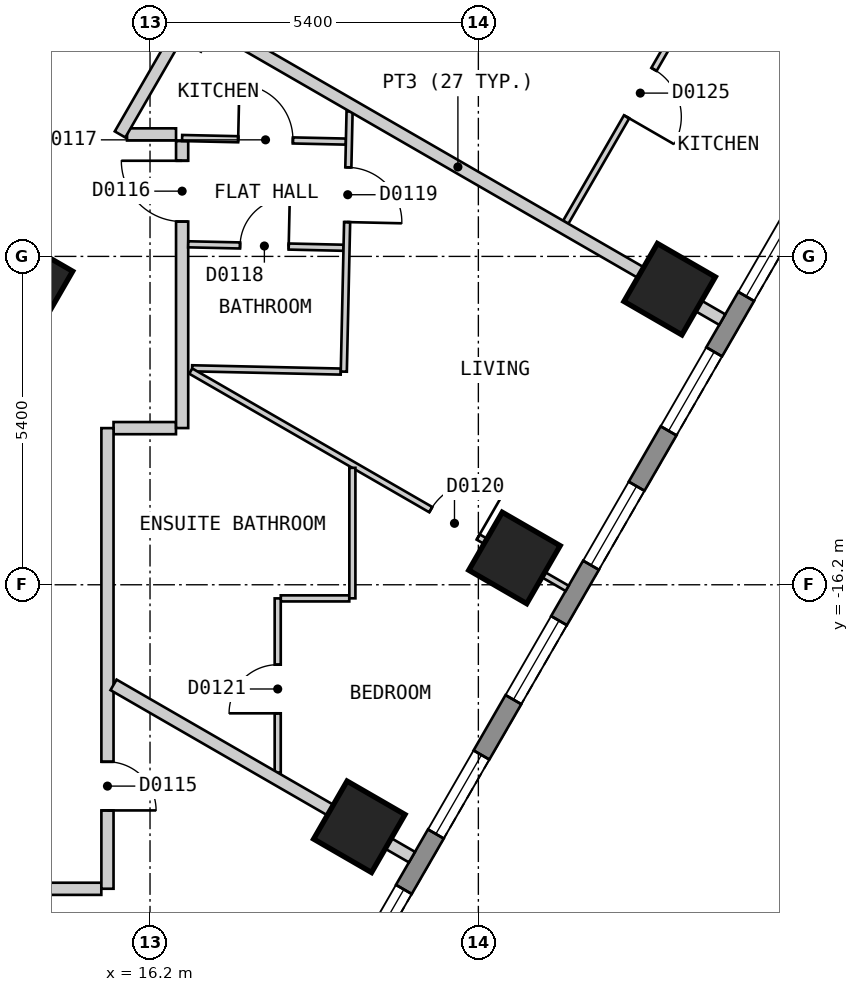
"""IFC4 building model, lengths in metres.
Left out: names, types, materials, properties, quantities, classifications, styles, units other than length and angle.
Written with IfcOpenShell. Run it as: python <this file> out.ifc"""

import sys

from ifc_helpers import new_model, si_unit, direction, frame, frame_2d, origin, origin_2d, place, context, subcontext, project, spatial, polyline, rectangle, outline, extrude, element, fill, save


model = new_model("IFC4")
c1 = context("Model", 3, precision=1e-05, world=origin(), true_north=direction((0.0, 1.0)))
c2 = subcontext(c1, "Body", "Model", "MODEL_VIEW")
j1 = project(units=[si_unit("LENGTHUNIT", "METRE"), si_unit("PLANEANGLEUNIT", "RADIAN")], contexts=[c1])
p1 = place(None, origin())
s1 = spatial("IfcSite", under=j1, at=p1, CompositionType="ELEMENT")
p2 = place(p1, origin())
s2 = spatial("IfcBuilding", under=s1, at=p2, CompositionType="ELEMENT")
p3 = place(p2, frame((0.0, 0.0, 29.4)))
s3 = spatial("IfcBuildingStorey", under=s2, at=p3, CompositionType="ELEMENT", Elevation=29.4)
for number, where, z_axis, x_axis in (
    (1, (19.642, -20.18, 0.0), (0.0, 0.0, 1.0), (0.5, 0.866, 0.0)),
    (2, (22.194, -15.759, 0.0), (0.0, 0.0, 1.0), (0.5, 0.866, 0.0)),
    (3, (24.746, -11.339, 0.0), (0.0, 0.0, 1.0), (0.5, 0.866, 0.0)),
    (4, (27.298, -6.919, 0.0), (0.0, 0.0, 1.0), (0.5, 0.866, 0.0)),
):
    element("IfcColumn", number, at=place(p3, frame(where, z_axis=z_axis, x_axis=x_axis)), inside=s3, PredefinedType="COLUMN", context=c2, shape_type="SweptSolid", body=[
        extrude(rectangle(XDim=1.1, YDim=1.1, at=origin_2d()), origin(), (0.0, 0.0, 1.0), 3.0),
    ])
p4 = place(p3, frame((14.313, -11.209, 0.0), z_axis=(0.0, 0.0, 1.0), x_axis=(0.499984884929, 0.866034130299, 0.0)))
e5 = element("IfcColumn", 5, at=p4, inside=s3, PredefinedType="COLUMN", context=c2, shape_type="SweptSolid", body=[
    extrude(rectangle(XDim=0.9, YDim=0.9, at=origin_2d()), origin(), (0.0, 0.0, 1.0), 3.0),
])
p5 = place(p3, frame((17.71, -25.825, 0.0), z_axis=(0.0, 0.0, 1.0), x_axis=(0.500001938803, 0.866024284413, 0.0)))
e6 = element("IfcWall", 6, at=p5, inside=s3, PredefinedType="SOLIDWALL", context=c2, shape_type="SweptSolid", body=[
    extrude(outline(polyline([(0.0, -0.15), (27.02, -0.15), (26.94, 0.15), (0.08, 0.15), (0.0, -0.15)])), origin(), (0.0, 0.0, 1.0), 2.7),
])
p6 = place(p5, frame((1.277, 0.0, 0.15)))
e7 = element("IfcOpeningElement", 7, at=p6, cuts=e6, PredefinedType="OPENING", context=c2, shape_type="SweptSolid", body=[
    extrude(rectangle(XDim=1.5, YDim=2.1, at=frame_2d((0.75, 1.05))), frame((0.0, 0.16, 0.0), z_axis=(0.0, -1.0, 0.0), x_axis=(1.0, 0.0, 0.0)), (0.0, 0.0, 1.0), 0.32),
])
p7 = place(p5, frame((3.829, 0.0, 0.15)))
e8 = element("IfcOpeningElement", 8, at=p7, cuts=e6, PredefinedType="OPENING", context=c2, shape_type="SweptSolid", body=[
    extrude(rectangle(XDim=1.5, YDim=2.1, at=frame_2d((0.75, 1.05))), frame((0.0, 0.16, 0.0), z_axis=(0.0, -1.0, 0.0), x_axis=(1.0, 0.0, 0.0)), (0.0, 0.0, 1.0), 0.32),
])
p8 = place(p5, frame((6.382, 0.0, 0.15)))
e9 = element("IfcOpeningElement", 9, at=p8, cuts=e6, PredefinedType="OPENING", context=c2, shape_type="SweptSolid", body=[
    extrude(rectangle(XDim=1.5, YDim=2.1, at=frame_2d((0.75, 1.05))), frame((0.0, 0.16, 0.0), z_axis=(0.0, -1.0, 0.0), x_axis=(1.0, 0.0, 0.0)), (0.0, 0.0, 1.0), 0.32),
])
p9 = place(p5, frame((8.933, 0.0, 0.15)))
e10 = element("IfcOpeningElement", 10, at=p9, cuts=e6, PredefinedType="OPENING", context=c2, shape_type="SweptSolid", body=[
    extrude(rectangle(XDim=1.5, YDim=2.1, at=frame_2d((0.75, 1.05))), frame((0.0, 0.16, 0.0), z_axis=(0.0, -1.0, 0.0), x_axis=(1.0, 0.0, 0.0)), (0.0, 0.0, 1.0), 0.32),
])
p10 = place(p5, frame((11.485, 0.0, 0.15)))
e11 = element("IfcOpeningElement", 11, at=p10, cuts=e6, PredefinedType="OPENING", context=c2, shape_type="SweptSolid", body=[
    extrude(rectangle(XDim=1.5, YDim=2.1, at=frame_2d((0.75, 1.05))), frame((0.0, 0.16, 0.0), z_axis=(0.0, -1.0, 0.0), x_axis=(1.0, 0.0, 0.0)), (0.0, 0.0, 1.0), 0.32),
])
p11 = place(p5, frame((14.037, 0.0, 0.15)))
e12 = element("IfcOpeningElement", 12, at=p11, cuts=e6, PredefinedType="OPENING", context=c2, shape_type="SweptSolid", body=[
    extrude(rectangle(XDim=1.5, YDim=2.1, at=frame_2d((0.75, 1.05))), frame((0.0, 0.16, 0.0), z_axis=(0.0, -1.0, 0.0), x_axis=(1.0, 0.0, 0.0)), (0.0, 0.0, 1.0), 0.32),
])
p12 = place(p5, frame((16.589, 0.0, 0.15)))
e13 = element("IfcOpeningElement", 13, at=p12, cuts=e6, PredefinedType="OPENING", context=c2, shape_type="SweptSolid", body=[
    extrude(rectangle(XDim=1.5, YDim=2.1, at=frame_2d((0.75, 1.05))), frame((0.0, 0.16, 0.0), z_axis=(0.0, -1.0, 0.0), x_axis=(1.0, 0.0, 0.0)), (0.0, 0.0, 1.0), 0.32),
])
p13 = place(p5, frame((19.141, 0.0, 0.15)))
e14 = element("IfcOpeningElement", 14, at=p13, cuts=e6, PredefinedType="OPENING", context=c2, shape_type="SweptSolid", body=[
    extrude(rectangle(XDim=1.5, YDim=2.1, at=frame_2d((0.75, 1.05))), frame((0.0, 0.16, 0.0), z_axis=(0.0, -1.0, 0.0), x_axis=(1.0, 0.0, 0.0)), (0.0, 0.0, 1.0), 0.32),
])
p14 = place(p5, frame((21.693, 0.0, 0.15)))
e15 = element("IfcOpeningElement", 15, at=p14, cuts=e6, PredefinedType="OPENING", context=c2, shape_type="SweptSolid", body=[
    extrude(rectangle(XDim=1.5, YDim=2.1, at=frame_2d((0.75, 1.05))), frame((0.0, 0.16, 0.0), z_axis=(0.0, -1.0, 0.0), x_axis=(1.0, 0.0, 0.0)), (0.0, 0.0, 1.0), 0.32),
])
p15 = place(p5, frame((24.244, 0.0, 0.15)))
e16 = element("IfcOpeningElement", 16, at=p15, cuts=e6, PredefinedType="OPENING", context=c2, shape_type="SweptSolid", body=[
    extrude(rectangle(XDim=1.5, YDim=2.1, at=frame_2d((0.75, 1.05))), frame((0.0, 0.16, 0.0), z_axis=(0.0, -1.0, 0.0), x_axis=(1.0, 0.0, 0.0)), (0.0, 0.0, 1.0), 0.32),
])
p16 = place(p3, frame((15.822, -8.794, 0.0), z_axis=(0.0, 0.0, 1.0), x_axis=(1.0, 0.0, 0.0)))
e17 = element("IfcWall", 17, at=p16, inside=s3, PredefinedType="PARTITIONING", context=c2, shape_type="SweptSolid", body=[
    extrude(rectangle(XDim=0.806, YDim=0.2, at=frame_2d((0.403, 0.0))), origin(), (0.0, 0.0, 1.0), 2.7),
])
p17 = place(p3, frame((15.6, -13.624, 0.0), z_axis=(0.0, 0.0, 1.0), x_axis=(1.0, 0.0, 0.0)))
e18 = element("IfcWall", 18, at=p17, inside=s3, PredefinedType="PARTITIONING", context=c2, shape_type="SweptSolid", body=[
    extrude(rectangle(XDim=1.027, YDim=0.2, at=frame_2d((0.513, 0.0))), origin(), (0.0, 0.0, 1.0), 2.7),
])
p18 = place(p3, frame((-15.4, -21.2, 0.0), z_axis=(0.0, 0.0, 1.0), x_axis=(1.0, 0.0, 0.0)))
e19 = element("IfcWall", 19, at=p18, inside=s3, PredefinedType="PARTITIONING", context=c2, shape_type="SweptSolid", body=[
    extrude(rectangle(XDim=30.799, YDim=0.2, at=frame_2d((15.399, 0.0))), origin(), (0.0, 0.0, 1.0), 2.7),
])
p19 = place(p18, frame((4.985, 0.0, 0.0)))
e20 = element("IfcOpeningElement", 20, at=p19, cuts=e19, PredefinedType="OPENING", context=c2, shape_type="SweptSolid", body=[
    extrude(rectangle(XDim=0.9, YDim=2.1, at=frame_2d((0.45, 1.05))), frame((0.0, 0.11, 0.0), z_axis=(0.0, -1.0, 0.0), x_axis=(1.0, 0.0, 0.0)), (0.0, 0.0, 1.0), 0.22),
])
p20 = place(p18, frame((14.901, 0.0, 0.0)))
e21 = element("IfcOpeningElement", 21, at=p20, cuts=e19, PredefinedType="OPENING", context=c2, shape_type="SweptSolid", body=[
    extrude(rectangle(XDim=1.0, YDim=2.1, at=frame_2d((0.5, 1.05))), frame((0.0, 0.11, 0.0), z_axis=(0.0, -1.0, 0.0), x_axis=(1.0, 0.0, 0.0)), (0.0, 0.0, 1.0), 0.22),
])
p21 = place(p18, frame((20.005, 0.0, 0.0)))
e22 = element("IfcOpeningElement", 22, at=p21, cuts=e19, PredefinedType="OPENING", context=c2, shape_type="SweptSolid", body=[
    extrude(rectangle(XDim=1.0, YDim=2.1, at=frame_2d((0.5, 1.05))), frame((0.0, 0.11, 0.0), z_axis=(0.0, -1.0, 0.0), x_axis=(1.0, 0.0, 0.0)), (0.0, 0.0, 1.0), 0.22),
])
p22 = place(p18, frame((24.916, 0.0, 0.0)))
e23 = element("IfcOpeningElement", 23, at=p22, cuts=e19, PredefinedType="OPENING", context=c2, shape_type="SweptSolid", body=[
    extrude(rectangle(XDim=0.9, YDim=2.1, at=frame_2d((0.45, 1.05))), frame((0.0, 0.11, 0.0), z_axis=(0.0, -1.0, 0.0), x_axis=(1.0, 0.0, 0.0)), (0.0, 0.0, 1.0), 0.22),
])
p23 = place(p3, frame((15.707, -8.794, 0.0), z_axis=(0.0, 0.0, 1.0), x_axis=(0.500040469623, 0.866002037376, 0.0)))
e24 = element("IfcWall", 24, at=p23, inside=s3, PredefinedType="PARTITIONING", context=c2, shape_type="SweptSolid", body=[
    extrude(rectangle(XDim=2.281, YDim=0.2, at=frame_2d((1.141, 0.0))), origin(), (0.0, 0.0, 1.0), 2.7),
])
p24 = place(p3, frame((15.5, -21.199, 0.0), z_axis=(0.0, 0.0, 1.0), x_axis=(0.0, 1.0, 0.0)))
e25 = element("IfcWall", 25, at=p24, inside=s3, PredefinedType="PARTITIONING", context=c2, shape_type="SweptSolid", body=[
    extrude(rectangle(XDim=7.575, YDim=0.2, at=frame_2d((3.788, 0.0))), origin(), (0.0, 0.0, 1.0), 2.7),
])
p25 = place(p24, frame((1.288, 0.0, 0.0)))
e26 = element("IfcOpeningElement", 26, at=p25, cuts=e25, PredefinedType="OPENING", context=c2, shape_type="SweptSolid", body=[
    extrude(rectangle(XDim=0.8, YDim=2.1, at=frame_2d((0.4, 1.05))), frame((0.0, 0.11, 0.0), z_axis=(0.0, -1.0, 0.0), x_axis=(1.0, 0.0, 0.0)), (0.0, 0.0, 1.0), 0.22),
])
p26 = place(p3, frame((16.728, -13.623, 0.0), z_axis=(0.0, 0.0, 1.0), x_axis=(0.0, 1.0, 0.0)))
e27 = element("IfcWall", 27, at=p26, inside=s3, PredefinedType="PARTITIONING", context=c2, shape_type="SweptSolid", body=[
    extrude(rectangle(XDim=4.72, YDim=0.2, at=frame_2d((2.36, 0.0))), origin(), (0.0, 0.0, 1.0), 2.7),
])
p27 = place(p26, frame((3.396, 0.0, 0.0)))
e28 = element("IfcOpeningElement", 28, at=p27, cuts=e27, PredefinedType="OPENING", context=c2, shape_type="SweptSolid", body=[
    extrude(rectangle(XDim=1.0, YDim=2.1, at=frame_2d((0.5, 1.05))), frame((0.0, 0.11, 0.0), z_axis=(0.0, -1.0, 0.0), x_axis=(1.0, 0.0, 0.0)), (0.0, 0.0, 1.0), 0.22),
])
p28 = place(p3, frame((16.728, -8.853, 0.0), z_axis=(0.0, 0.0, 1.0), x_axis=(0.999759401479, -0.02193488442, 0.0)))
e29 = element("IfcWall", 29, at=p28, inside=s3, PredefinedType="PARTITIONING", context=c2, shape_type="SweptSolid", body=[
    extrude(rectangle(XDim=2.694, YDim=0.1, at=frame_2d((1.347, 0.0))), origin(), (0.0, 0.0, 1.0), 2.7),
])
p29 = place(p28, frame((0.922, 0.0, 0.0)))
e30 = element("IfcOpeningElement", 30, at=p29, cuts=e29, PredefinedType="OPENING", context=c2, shape_type="SweptSolid", body=[
    extrude(rectangle(XDim=0.9, YDim=2.1, at=frame_2d((0.45, 1.05))), frame((0.0, 0.06, 0.0), z_axis=(0.0, -1.0, 0.0), x_axis=(1.0, 0.0, 0.0)), (0.0, 0.0, 1.0), 0.12),
])
p30 = place(p3, frame((16.828, -10.601, 0.0), z_axis=(0.0, 0.0, 1.0), x_axis=(0.999752091799, -0.022265555094, 0.0)))
e31 = element("IfcWall", 31, at=p30, inside=s3, PredefinedType="PARTITIONING", context=c2, shape_type="SweptSolid", body=[
    extrude(rectangle(XDim=2.555, YDim=0.1, at=frame_2d((1.277, 0.0))), origin(), (0.0, 0.0, 1.0), 2.7),
])
p31 = place(p30, frame((0.853, 0.0, 0.0)))
e32 = element("IfcOpeningElement", 32, at=p31, cuts=e31, PredefinedType="OPENING", context=c2, shape_type="SweptSolid", body=[
    extrude(rectangle(XDim=0.8, YDim=2.1, at=frame_2d((0.4, 1.05))), frame((0.0, 0.06, 0.0), z_axis=(0.0, -1.0, 0.0), x_axis=(1.0, 0.0, 0.0)), (0.0, 0.0, 1.0), 0.12),
])
p32 = place(p3, frame((16.892, -12.64, 0.0), z_axis=(0.0, 0.0, 1.0), x_axis=(0.999754359069, -0.022163517846, 0.0)))
e33 = element("IfcWall", 33, at=p32, inside=s3, PredefinedType="PARTITIONING", context=c2, shape_type="SweptSolid", body=[
    extrude(rectangle(XDim=2.445, YDim=0.1, at=frame_2d((1.223, 0.0))), origin(), (0.0, 0.0, 1.0), 2.7),
])
p33 = place(p3, frame((16.87, -12.686, 0.0), z_axis=(0.0, 0.0, 1.0), x_axis=(0.866071826058, -0.499919585642, 0.0)))
e34 = element("IfcWall", 34, at=p33, inside=s3, PredefinedType="PARTITIONING", context=c2, shape_type="SweptSolid", body=[
    extrude(rectangle(XDim=7.147, YDim=0.1, at=frame_2d((3.574, 0.0))), origin(), (0.0, 0.0, 1.0), 2.7),
])
p34 = place(p33, frame((4.558, 0.0, 0.0)))
e35 = element("IfcOpeningElement", 35, at=p34, cuts=e34, PredefinedType="OPENING", context=c2, shape_type="SweptSolid", body=[
    extrude(rectangle(XDim=0.9, YDim=2.1, at=frame_2d((0.45, 1.05))), frame((0.0, 0.06, 0.0), z_axis=(0.0, -1.0, 0.0), x_axis=(1.0, 0.0, 0.0)), (0.0, 0.0, 1.0), 0.12),
])
p35 = place(p3, frame((19.503, -2.419, 0.0), z_axis=(0.0, 0.0, 1.0), x_axis=(0.866047370643, -0.499961950354, 0.0)))
e36 = element("IfcWall", 36, at=p35, inside=s3, PredefinedType="PARTITIONING", context=c2, shape_type="SweptSolid", body=[
    extrude(rectangle(XDim=10.001, YDim=0.1, at=frame_2d((5.0, 0.0))), origin(), (0.0, 0.0, 1.0), 2.7),
])
p36 = place(p35, frame((4.912, 0.0, 0.0)))
e37 = element("IfcOpeningElement", 37, at=p36, cuts=e36, PredefinedType="OPENING", context=c2, shape_type="SweptSolid", body=[
    extrude(rectangle(XDim=0.9, YDim=2.1, at=frame_2d((0.45, 1.05))), frame((0.0, 0.06, 0.0), z_axis=(0.0, -1.0, 0.0), x_axis=(1.0, 0.0, 0.0)), (0.0, 0.0, 1.0), 0.12),
])
p37 = place(p3, frame((18.35, -16.424, 0.0), z_axis=(0.0, 0.0, 1.0), x_axis=(1.0, 0.0, 0.0)))
e38 = element("IfcWall", 38, at=p37, inside=s3, PredefinedType="PARTITIONING", context=c2, shape_type="SweptSolid", body=[
    extrude(rectangle(XDim=1.127, YDim=0.1, at=frame_2d((0.563, 0.0))), origin(), (0.0, 0.0, 1.0), 2.7),
])
p38 = place(p3, frame((23.037, -10.238, 0.0), z_axis=(0.0, 0.0, 1.0), x_axis=(0.49999264683, 0.866029649098, 0.0)))
e39 = element("IfcWall", 39, at=p38, inside=s3, PredefinedType="PARTITIONING", context=c2, shape_type="SweptSolid", body=[
    extrude(rectangle(XDim=4.954, YDim=0.1, at=frame_2d((2.477, 0.0))), origin(), (0.0, 0.0, 1.0), 2.7),
])
p39 = place(p38, frame((2.002, 0.0, 0.0)))
e40 = element("IfcOpeningElement", 40, at=p39, cuts=e39, PredefinedType="OPENING", context=c2, shape_type="SweptSolid", body=[
    extrude(rectangle(XDim=0.9, YDim=2.1, at=frame_2d((0.45, 1.05))), frame((0.0, 0.06, 0.0), z_axis=(0.0, -1.0, 0.0), x_axis=(1.0, 0.0, 0.0)), (0.0, 0.0, 1.0), 0.12),
])
p40 = place(p3, frame((19.387, -12.695, 0.0), z_axis=(0.0, 0.0, 1.0), x_axis=(0.022188864436, 0.99975379684, 0.0)))
e41 = element("IfcWall", 41, at=p40, inside=s3, PredefinedType="PARTITIONING", context=c2, shape_type="SweptSolid", body=[
    extrude(rectangle(XDim=4.28, YDim=0.1, at=frame_2d((2.14, 0.0))), origin(), (0.0, 0.0, 1.0), 2.7),
])
p41 = place(p40, frame((2.46, 0.0, 0.0)))
e42 = element("IfcOpeningElement", 42, at=p41, cuts=e41, PredefinedType="OPENING", context=c2, shape_type="SweptSolid", body=[
    extrude(rectangle(XDim=0.9, YDim=2.1, at=frame_2d((0.45, 1.05))), frame((0.0, 0.06, 0.0), z_axis=(0.0, -1.0, 0.0), x_axis=(1.0, 0.0, 0.0)), (0.0, 0.0, 1.0), 0.12),
])
p42 = place(p3, frame((18.3, -19.289, 0.0), z_axis=(0.0, 0.0, 1.0), x_axis=(0.0, 1.0, 0.0)))
e43 = element("IfcWall", 43, at=p42, inside=s3, PredefinedType="PARTITIONING", context=c2, shape_type="SweptSolid", body=[
    extrude(rectangle(XDim=2.865, YDim=0.1, at=frame_2d((1.433, 0.0))), origin(), (0.0, 0.0, 1.0), 2.7),
])
p43 = place(p42, frame((0.975, 0.0, 0.0)))
e44 = element("IfcOpeningElement", 44, at=p43, cuts=e43, PredefinedType="OPENING", context=c2, shape_type="SweptSolid", body=[
    extrude(rectangle(XDim=0.8, YDim=2.1, at=frame_2d((0.4, 1.05))), frame((0.0, 0.06, 0.0), z_axis=(0.0, -1.0, 0.0), x_axis=(1.0, 0.0, 0.0)), (0.0, 0.0, 1.0), 0.12),
])
p44 = place(p3, frame((19.528, -16.423, 0.0), z_axis=(0.0, 0.0, 1.0), x_axis=(0.0, 1.0, 0.0)))
e45 = element("IfcWall", 45, at=p44, inside=s3, PredefinedType="PARTITIONING", context=c2, shape_type="SweptSolid", body=[
    extrude(rectangle(XDim=2.146, YDim=0.1, at=frame_2d((1.073, 0.0))), origin(), (0.0, 0.0, 1.0), 2.7),
])
p45 = place(p3, frame((12.297, -21.3, 0.0), z_axis=(0.0, 0.0, 1.0), x_axis=(0.500056399578, -0.865992839024, 0.0)))
e46 = element("IfcWall", 46, at=p45, inside=s3, PredefinedType="PARTITIONING", context=c2, shape_type="SweptSolid", body=[
    extrude(rectangle(XDim=6.455, YDim=0.2, at=frame_2d((3.228, 0.0))), origin(), (0.0, 0.0, 1.0), 2.7),
])
p46 = place(p3, frame((15.6, -17.846, 0.0), z_axis=(0.0, 0.0, 1.0), x_axis=(0.866071523686, -0.499920109479, 0.0)))
e47 = element("IfcWall", 47, at=p46, inside=s3, PredefinedType="PARTITIONING", context=c2, shape_type="SweptSolid", body=[
    extrude(rectangle(XDim=5.667, YDim=0.2, at=frame_2d((2.833, 0.0))), origin(), (0.0, 0.0, 1.0), 2.7),
])
p47 = place(p3, frame((16.916, -6.819, 0.0), z_axis=(0.0, 0.0, 1.0), x_axis=(0.866028876723, -0.499993984646, 0.0)))
e48 = element("IfcWall", 48, at=p47, inside=s3, PredefinedType="PARTITIONING", context=c2, shape_type="SweptSolid", body=[
    extrude(rectangle(XDim=10.04, YDim=0.2, at=frame_2d((5.02, 0.0))), origin(), (0.0, 0.0, 1.0), 2.7),
])
p48 = place(p7, origin())
e49 = element("IfcWindow", 49, at=p48, inside=s3, PartitioningType="SINGLE_PANEL", PredefinedType="WINDOW", context=c2, shape_type="SweptSolid", body=[
    extrude(rectangle(XDim=1.5, YDim=2.1, at=frame_2d((0.75, 1.05))), frame((0.0, 0.03, 0.0), z_axis=(0.0, -1.0, 0.0), x_axis=(1.0, 0.0, 0.0)), (0.0, 0.0, 1.0), 0.06),
])
fill(e8, e49)
p49 = place(p8, origin())
e50 = element("IfcWindow", 50, at=p49, inside=s3, PartitioningType="SINGLE_PANEL", PredefinedType="WINDOW", context=c2, shape_type="SweptSolid", body=[
    extrude(rectangle(XDim=1.5, YDim=2.1, at=frame_2d((0.75, 1.05))), frame((0.0, 0.03, 0.0), z_axis=(0.0, -1.0, 0.0), x_axis=(1.0, 0.0, 0.0)), (0.0, 0.0, 1.0), 0.06),
])
fill(e9, e50)
p50 = place(p9, origin())
e51 = element("IfcWindow", 51, at=p50, inside=s3, PartitioningType="SINGLE_PANEL", PredefinedType="WINDOW", context=c2, shape_type="SweptSolid", body=[
    extrude(rectangle(XDim=1.5, YDim=2.1, at=frame_2d((0.75, 1.05))), frame((0.0, 0.03, 0.0), z_axis=(0.0, -1.0, 0.0), x_axis=(1.0, 0.0, 0.0)), (0.0, 0.0, 1.0), 0.06),
])
fill(e10, e51)
p51 = place(p10, origin())
e52 = element("IfcWindow", 52, at=p51, inside=s3, PartitioningType="SINGLE_PANEL", PredefinedType="WINDOW", context=c2, shape_type="SweptSolid", body=[
    extrude(rectangle(XDim=1.5, YDim=2.1, at=frame_2d((0.75, 1.05))), frame((0.0, 0.03, 0.0), z_axis=(0.0, -1.0, 0.0), x_axis=(1.0, 0.0, 0.0)), (0.0, 0.0, 1.0), 0.06),
])
fill(e11, e52)
p52 = place(p11, origin())
e53 = element("IfcWindow", 53, at=p52, inside=s3, PartitioningType="SINGLE_PANEL", PredefinedType="WINDOW", context=c2, shape_type="SweptSolid", body=[
    extrude(rectangle(XDim=1.5, YDim=2.1, at=frame_2d((0.75, 1.05))), frame((0.0, 0.03, 0.0), z_axis=(0.0, -1.0, 0.0), x_axis=(1.0, 0.0, 0.0)), (0.0, 0.0, 1.0), 0.06),
])
fill(e12, e53)
p53 = place(p12, origin())
e54 = element("IfcWindow", 54, at=p53, inside=s3, PartitioningType="SINGLE_PANEL", PredefinedType="WINDOW", context=c2, shape_type="SweptSolid", body=[
    extrude(rectangle(XDim=1.5, YDim=2.1, at=frame_2d((0.75, 1.05))), frame((0.0, 0.03, 0.0), z_axis=(0.0, -1.0, 0.0), x_axis=(1.0, 0.0, 0.0)), (0.0, 0.0, 1.0), 0.06),
])
fill(e13, e54)
p54 = place(p25, origin())
e55 = element("IfcDoor", 55, at=p54, inside=s3, OperationType="SINGLE_SWING_LEFT", PredefinedType="DOOR", context=c2, shape_type="SweptSolid", body=[
    extrude(rectangle(XDim=0.8, YDim=2.1, at=frame_2d((0.4, 1.05))), frame((0.0, 0.025, 0.0), z_axis=(0.0, -1.0, 0.0), x_axis=(1.0, 0.0, 0.0)), (0.0, 0.0, 1.0), 0.05),
])
fill(e26, e55)
p55 = place(p27, origin())
e56 = element("IfcDoor", 56, at=p55, inside=s3, OperationType="SINGLE_SWING_RIGHT", PredefinedType="DOOR", context=c2, shape_type="SweptSolid", body=[
    extrude(rectangle(XDim=1.0, YDim=2.1, at=frame_2d((0.5, 1.05))), frame((0.0, 0.025, 0.0), z_axis=(0.0, -1.0, 0.0), x_axis=(1.0, 0.0, 0.0)), (0.0, 0.0, 1.0), 0.05),
])
fill(e28, e56)
p56 = place(p29, origin())
e57 = element("IfcDoor", 57, at=p56, inside=s3, OperationType="SINGLE_SWING_LEFT", PredefinedType="DOOR", context=c2, shape_type="SweptSolid", body=[
    extrude(rectangle(XDim=0.9, YDim=2.1, at=frame_2d((0.45, 1.05))), frame((0.0, 0.025, 0.0), z_axis=(0.0, -1.0, 0.0), x_axis=(1.0, 0.0, 0.0)), (0.0, 0.0, 1.0), 0.05),
])
fill(e30, e57)
p57 = place(p31, origin())
e58 = element("IfcDoor", 58, at=p57, inside=s3, OperationType="SINGLE_SWING_RIGHT", PredefinedType="DOOR", context=c2, shape_type="SweptSolid", body=[
    extrude(rectangle(XDim=0.8, YDim=2.1, at=frame_2d((0.4, 1.05))), frame((0.0, 0.025, 0.0), z_axis=(0.0, -1.0, 0.0), x_axis=(1.0, 0.0, 0.0)), (0.0, 0.0, 1.0), 0.05),
])
fill(e32, e58)
p58 = place(p41, origin())
e59 = element("IfcDoor", 59, at=p58, inside=s3, OperationType="SINGLE_SWING_LEFT", PredefinedType="DOOR", context=c2, shape_type="SweptSolid", body=[
    extrude(rectangle(XDim=0.9, YDim=2.1, at=frame_2d((0.45, 1.05))), frame((0.0, 0.025, 0.0), z_axis=(0.0, -1.0, 0.0), x_axis=(1.0, 0.0, 0.0)), (0.0, 0.0, 1.0), 0.05),
])
fill(e42, e59)
p59 = place(p34, origin())
e60 = element("IfcDoor", 60, at=p59, inside=s3, OperationType="SINGLE_SWING_RIGHT", PredefinedType="DOOR", context=c2, shape_type="SweptSolid", body=[
    extrude(rectangle(XDim=0.9, YDim=2.1, at=frame_2d((0.45, 1.05))), frame((0.0, 0.025, 0.0), z_axis=(0.0, -1.0, 0.0), x_axis=(1.0, 0.0, 0.0)), (0.0, 0.0, 1.0), 0.05),
])
fill(e35, e60)
p60 = place(p43, origin())
e61 = element("IfcDoor", 61, at=p60, inside=s3, OperationType="SINGLE_SWING_LEFT", PredefinedType="DOOR", context=c2, shape_type="SweptSolid", body=[
    extrude(rectangle(XDim=0.8, YDim=2.1, at=frame_2d((0.4, 1.05))), frame((0.0, 0.025, 0.0), z_axis=(0.0, -1.0, 0.0), x_axis=(1.0, 0.0, 0.0)), (0.0, 0.0, 1.0), 0.05),
])
fill(e44, e61)
p61 = place(p39, origin())
e62 = element("IfcDoor", 62, at=p61, inside=s3, OperationType="SINGLE_SWING_LEFT", PredefinedType="DOOR", context=c2, shape_type="SweptSolid", body=[
    extrude(rectangle(XDim=0.9, YDim=2.1, at=frame_2d((0.45, 1.05))), frame((0.0, 0.025, 0.0), z_axis=(0.0, -1.0, 0.0), x_axis=(1.0, 0.0, 0.0)), (0.0, 0.0, 1.0), 0.05),
])
fill(e40, e62)
save(model, sys.argv[1])
